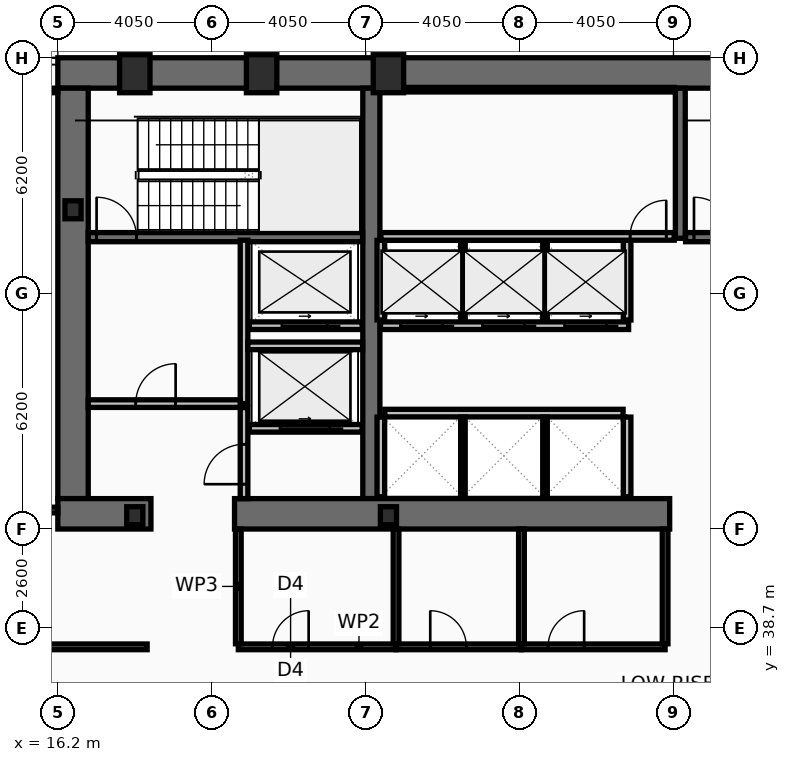
"""IFC4 building model, lengths in metres.
Left out: names, types, materials, properties, quantities, classifications, styles, units other than length and angle.
Written with IfcOpenShell. Run it as: python <this file> out.ifc"""

import sys

from ifc_helpers import new_model, si_unit, direction, frame, frame_2d, origin, origin_2d, place, context, subcontext, project, spatial, rectangle, hollow_rectangle, i_section, extrude, element, fill, save


model = new_model("IFC4")
c1 = context("Model", 3, precision=1e-05, world=origin(), true_north=direction((0.0, 1.0)))
c2 = subcontext(c1, "Body", "Model", "MODEL_VIEW")
j1 = project(units=[si_unit("LENGTHUNIT", "METRE"), si_unit("PLANEANGLEUNIT", "RADIAN")], contexts=[c1])
p1 = place(None, origin())
s1 = spatial("IfcSite", under=j1, at=p1, CompositionType="ELEMENT")
p2 = place(p1, origin())
s2 = spatial("IfcBuilding", under=s1, at=p2, CompositionType="ELEMENT")
p3 = place(p2, frame((0.0, 0.0, 77.8)))
s3 = spatial("IfcBuildingStorey", under=s2, at=p3, CompositionType="ELEMENT", Elevation=77.8)
p4 = place(p3, frame((16.2, 53.3, 0.0), z_axis=(0.0, 0.0, 1.0), x_axis=(1.0, 0.0, 0.0)))
e1 = element("IfcWall", 1, at=p4, inside=s3, PredefinedType="SHEAR", context=c2, shape_type="SweptSolid", body=[
    extrude(rectangle(XDim=40.5, YDim=0.8, at=frame_2d((20.25, 0.0))), origin(), (0.0, 0.0, 1.0), 3.82),
])
p5 = place(p3, frame((16.6, 42.1, 0.0), z_axis=(0.0, 0.0, 1.0), x_axis=(0.0, 1.0, 0.0)))
e2 = element("IfcWall", 2, at=p5, inside=s3, PredefinedType="SHEAR", context=c2, shape_type="SweptSolid", body=[
    extrude(rectangle(XDim=10.8, YDim=0.8, at=frame_2d((5.4, 0.0))), origin(), (0.0, 0.0, 1.0), 3.82),
])
p6 = place(p3, frame((24.45, 42.1, 0.0), z_axis=(0.0, 0.0, 1.0), x_axis=(0.0, 1.0, 0.0)))
e3 = element("IfcWall", 3, at=p6, inside=s3, PredefinedType="SHEAR", context=c2, shape_type="SweptSolid", body=[
    extrude(rectangle(XDim=10.8, YDim=0.45, at=frame_2d((5.4, 0.0))), origin(), (0.0, 0.0, 1.0), 3.82),
])
p7 = place(p3, frame((18.65, 41.7, 0.0), z_axis=(0.0, 0.0, 1.0), x_axis=(-1.0, 0.0, 0.0)))
e4 = element("IfcWall", 4, at=p7, inside=s3, PredefinedType="SHEAR", context=c2, shape_type="SweptSolid", body=[
    extrude(rectangle(XDim=2.45, YDim=0.8, at=frame_2d((1.225, 0.0))), origin(), (0.0, 0.0, 1.0), 3.82),
])
p8 = place(p3, frame((32.3, 41.7, 0.0), z_axis=(0.0, 0.0, 1.0), x_axis=(-1.0, 0.0, 0.0)))
e5 = element("IfcWall", 5, at=p8, inside=s3, PredefinedType="SHEAR", context=c2, shape_type="SweptSolid", body=[
    extrude(rectangle(XDim=11.45, YDim=0.8, at=frame_2d((5.725, 0.0))), origin(), (0.0, 0.0, 1.0), 3.82),
])
p9 = place(p3, frame((32.58, 48.95, 0.0), z_axis=(0.0, 0.0, 1.0), x_axis=(0.0, 1.0, 0.0)))
e6 = element("IfcWall", 6, at=p9, inside=s3, PredefinedType="SHEAR", context=c2, shape_type="SweptSolid", body=[
    extrude(rectangle(XDim=3.95, YDim=0.26, at=frame_2d((1.975, 0.0))), origin(), (0.0, 0.0, 1.0), 3.82),
])
p10 = place(p3, frame((17.0, 48.98, 0.0), z_axis=(0.0, 0.0, 1.0), x_axis=(1.0, 0.0, 0.0)))
e7 = element("IfcWall", 7, at=p10, inside=s3, PredefinedType="SHEAR", context=c2, shape_type="SweptSolid", body=[
    extrude(rectangle(XDim=7.22, YDim=0.24, at=frame_2d((3.61, 0.0))), origin(), (0.0, 0.0, 1.0), 3.82),
])
p11 = place(p10, frame((0.22, 0.0, 0.0)))
e8 = element("IfcOpeningElement", 8, at=p11, cuts=e7, PredefinedType="OPENING", context=c2, shape_type="SweptSolid", body=[
    extrude(rectangle(XDim=1.05, YDim=2.15, at=frame_2d((0.525, 1.075))), frame((0.0, 0.13, 0.0), z_axis=(0.0, -1.0, 0.0), x_axis=(1.0, 0.0, 0.0)), (0.0, 0.0, 1.0), 0.26),
])
p12 = place(p3, frame((32.72, 48.98, 0.0), z_axis=(0.0, 0.0, 1.0), x_axis=(1.0, 0.0, 0.0)))
e9 = element("IfcWall", 9, at=p12, inside=s3, PredefinedType="SHEAR", context=c2, shape_type="SweptSolid", body=[
    extrude(rectangle(XDim=7.56, YDim=0.24, at=frame_2d((3.78, 0.0))), origin(), (0.0, 0.0, 1.0), 3.82),
])
p13 = place(p12, frame((0.22, 0.0, 0.0)))
e10 = element("IfcOpeningElement", 10, at=p13, cuts=e9, PredefinedType="OPENING", context=c2, shape_type="SweptSolid", body=[
    extrude(rectangle(XDim=1.05, YDim=2.15, at=frame_2d((0.525, 1.075))), frame((0.0, 0.13, 0.0), z_axis=(0.0, -1.0, 0.0), x_axis=(1.0, 0.0, 0.0)), (0.0, 0.0, 1.0), 0.26),
])
for number, where, z_axis, x_axis in (
    (11, (18.225, 53.28, 0.0), (0.0, 0.0, 1.0), (1.0, 0.0, 0.0)),
    (12, (21.562, 53.28, 0.0), (0.0, 0.0, 1.0), (1.0, 0.0, 0.0)),
    (13, (24.9, 53.28, 0.0), (0.0, 0.0, 1.0), (1.0, 0.0, 0.0)),
):
    element("IfcColumn", number, at=place(p3, frame(where, z_axis=z_axis, x_axis=x_axis)), inside=s3, PredefinedType="COLUMN", context=c2, shape_type="SweptSolid", body=[
        extrude(hollow_rectangle(XDim=0.8, YDim=1.0, WallThickness=0.055, at=origin_2d()), origin(), (0.0, 0.0, 1.0), 4.0),
    ])
for number, where, z_axis, x_axis in (
    (14, (16.6, 49.7, 0.0), (0.0, 0.0, 1.0), (1.0, 0.0, 0.0)),
    (15, (18.225, 41.65, 0.0), (0.0, 0.0, 1.0), (1.0, 0.0, 0.0)),
    (16, (24.9, 41.65, 0.0), (0.0, 0.0, 1.0), (1.0, 0.0, 0.0)),
):
    element("IfcColumn", number, at=place(p3, frame(where, z_axis=z_axis, x_axis=x_axis)), inside=s3, PredefinedType="COLUMN", context=c2, shape_type="SweptSolid", body=[
        extrude(i_section(OverallWidth=0.424, OverallDepth=0.474, WebThickness=0.048, FlangeThickness=0.077, at=origin_2d()), origin(), (0.0, 0.0, 1.0), 4.0),
    ])
p14 = place(p3, frame((24.21, 43.95, 0.0), z_axis=(0.0, 0.0, 1.0), x_axis=(-1.0, 0.0, 0.0)))
e17 = element("IfcWall", 17, at=p14, inside=s3, PredefinedType="PARTITIONING", context=c2, shape_type="SweptSolid", body=[
    extrude(rectangle(XDim=2.97, YDim=0.2, at=frame_2d((1.485, 0.0))), origin(), (0.0, 0.0, 1.0), 3.82),
])
p15 = place(p14, frame((0.86, 0.0, 0.0)))
e18 = element("IfcOpeningElement", 18, at=p15, cuts=e17, PredefinedType="OPENING", context=c2, shape_type="SweptSolid", body=[
    extrude(rectangle(XDim=1.3, YDim=2.18, at=frame_2d((0.65, 1.09))), frame((0.0, 0.11, 0.0), z_axis=(0.0, -1.0, 0.0), x_axis=(1.0, 0.0, 0.0)), (0.0, 0.0, 1.0), 0.22),
])
p16 = place(p3, frame((24.21, 46.65, 0.0), z_axis=(0.0, 0.0, 1.0), x_axis=(-1.0, 0.0, 0.0)))
e19 = element("IfcWall", 19, at=p16, inside=s3, PredefinedType="PARTITIONING", context=c2, shape_type="SweptSolid", body=[
    extrude(rectangle(XDim=2.97, YDim=0.2, at=frame_2d((1.485, 0.0))), origin(), (0.0, 0.0, 1.0), 3.82),
])
p17 = place(p16, frame((0.91, 0.0, 0.0)))
e20 = element("IfcOpeningElement", 20, at=p17, cuts=e19, PredefinedType="OPENING", context=c2, shape_type="SweptSolid", body=[
    extrude(rectangle(XDim=1.2, YDim=2.18, at=frame_2d((0.6, 1.09))), frame((0.0, 0.11, 0.0), z_axis=(0.0, -1.0, 0.0), x_axis=(1.0, 0.0, 0.0)), (0.0, 0.0, 1.0), 0.22),
])
p18 = place(p3, frame((31.22, 46.65, 0.0), z_axis=(0.0, 0.0, 1.0), x_axis=(-1.0, 0.0, 0.0)))
e21 = element("IfcWall", 21, at=p18, inside=s3, PredefinedType="PARTITIONING", context=c2, shape_type="SweptSolid", body=[
    extrude(rectangle(XDim=6.53, YDim=0.2, at=frame_2d((3.265, 0.0))), origin(), (0.0, 0.0, 1.0), 3.82),
])
p19 = place(p18, frame((4.9, 0.0, 0.0)))
e22 = element("IfcOpeningElement", 22, at=p19, cuts=e21, PredefinedType="OPENING", context=c2, shape_type="SweptSolid", body=[
    extrude(rectangle(XDim=1.1, YDim=2.18, at=frame_2d((0.55, 1.09))), frame((0.0, 0.11, 0.0), z_axis=(0.0, -1.0, 0.0), x_axis=(1.0, 0.0, 0.0)), (0.0, 0.0, 1.0), 0.22),
])
p20 = place(p18, frame((2.74, 0.0, 0.0)))
e23 = element("IfcOpeningElement", 23, at=p20, cuts=e21, PredefinedType="OPENING", context=c2, shape_type="SweptSolid", body=[
    extrude(rectangle(XDim=1.1, YDim=2.18, at=frame_2d((0.55, 1.09))), frame((0.0, 0.11, 0.0), z_axis=(0.0, -1.0, 0.0), x_axis=(1.0, 0.0, 0.0)), (0.0, 0.0, 1.0), 0.22),
])
p21 = place(p18, frame((0.58, 0.0, 0.0)))
e24 = element("IfcOpeningElement", 24, at=p21, cuts=e21, PredefinedType="OPENING", context=c2, shape_type="SweptSolid", body=[
    extrude(rectangle(XDim=1.1, YDim=2.18, at=frame_2d((0.55, 1.09))), frame((0.0, 0.11, 0.0), z_axis=(0.0, -1.0, 0.0), x_axis=(1.0, 0.0, 0.0)), (0.0, 0.0, 1.0), 0.22),
])
p22 = place(p3, frame((21.1, 44.6, 0.0), z_axis=(0.0, 0.0, 1.0), x_axis=(0.0, 1.0, 0.0)))
e25 = element("IfcWall", 25, at=p22, inside=s3, PredefinedType="PARTITIONING", context=c2, shape_type="SweptSolid", body=[
    extrude(rectangle(XDim=4.3, YDim=0.2, at=frame_2d((2.15, 0.0))), origin(), (0.0, 0.0, 1.0), 3.82),
])
p23 = place(p3, frame((17.0, 44.6, 0.0), z_axis=(0.0, 0.0, 1.0), x_axis=(1.0, 0.0, 0.0)))
e26 = element("IfcWall", 26, at=p23, inside=s3, PredefinedType="PARTITIONING", context=c2, shape_type="SweptSolid", body=[
    extrude(rectangle(XDim=4.0, YDim=0.2, at=frame_2d((2.0, 0.0))), origin(), (0.0, 0.0, 1.0), 3.82),
])
p24 = place(p23, frame((1.25, 0.0, 0.0)))
e27 = element("IfcOpeningElement", 27, at=p24, cuts=e26, PredefinedType="OPENING", context=c2, shape_type="SweptSolid", body=[
    extrude(rectangle(XDim=1.05, YDim=2.15, at=frame_2d((0.525, 1.075))), frame((0.0, 0.11, 0.0), z_axis=(0.0, -1.0, 0.0), x_axis=(1.0, 0.0, 0.0)), (0.0, 0.0, 1.0), 0.22),
])
p25 = place(p3, frame((21.2, 46.12, 0.0), z_axis=(0.0, 0.0, 1.0), x_axis=(1.0, 0.0, 0.0)))
e28 = element("IfcWall", 28, at=p25, inside=s3, PredefinedType="PARTITIONING", context=c2, shape_type="SweptSolid", body=[
    extrude(rectangle(XDim=3.02, YDim=0.2, at=frame_2d((1.51, 0.0))), origin(), (0.0, 0.0, 1.0), 3.82),
])
p26 = place(p3, frame((21.1, 42.1, 0.0), z_axis=(0.0, 0.0, 1.0), x_axis=(0.0, 1.0, 0.0)))
e29 = element("IfcWall", 29, at=p26, inside=s3, PredefinedType="PARTITIONING", context=c2, shape_type="SweptSolid", body=[
    extrude(rectangle(XDim=2.395, YDim=0.2, at=frame_2d((1.198, 0.0))), origin(), (0.0, 0.0, 1.0), 3.82),
])
p27 = place(p26, frame((0.38, 0.0, 0.0)))
e30 = element("IfcOpeningElement", 30, at=p27, cuts=e29, PredefinedType="OPENING", context=c2, shape_type="SweptSolid", body=[
    extrude(rectangle(XDim=1.05, YDim=2.15, at=frame_2d((0.525, 1.075))), frame((0.0, 0.11, 0.0), z_axis=(0.0, -1.0, 0.0), x_axis=(1.0, 0.0, 0.0)), (0.0, 0.0, 1.0), 0.22),
])
for number, where, z_axis, x_axis in (
    (31, (24.7, 46.8, 0.0), (0.0, 0.0, 1.0), (0.0, 1.0, 0.0)),
    (32, (31.18, 46.8, 0.0), (0.0, 0.0, 1.0), (0.0, 1.0, 0.0)),
):
    element("IfcWall", number, at=place(p3, frame(where, z_axis=z_axis, x_axis=x_axis)), inside=s3, PredefinedType="PARTITIONING", context=c2, shape_type="SweptSolid", body=[
        extrude(rectangle(XDim=2.095, YDim=0.2, at=frame_2d((1.047, 0.0))), origin(), (0.0, 0.0, 1.0), 3.82),
    ])
for number, where, z_axis, x_axis in (
    (33, (26.86, 46.8, 0.0), (0.0, 0.0, 1.0), (0.0, 1.0, 0.0)),
    (34, (29.02, 46.8, 0.0), (0.0, 0.0, 1.0), (0.0, 1.0, 0.0)),
):
    element("IfcWall", number, at=place(p3, frame(where, z_axis=z_axis, x_axis=x_axis)), inside=s3, PredefinedType="PARTITIONING", context=c2, shape_type="SweptSolid", body=[
        extrude(rectangle(XDim=2.095, YDim=0.12, at=frame_2d((1.047, 0.0))), origin(), (0.0, 0.0, 1.0), 3.82),
    ])
p28 = place(p3, frame((24.805, 44.35, 0.0), z_axis=(0.0, 0.0, 1.0), x_axis=(1.0, 0.0, 0.0)))
e35 = element("IfcWall", 35, at=p28, inside=s3, PredefinedType="PARTITIONING", context=c2, shape_type="SweptSolid", body=[
    extrude(rectangle(XDim=6.27, YDim=0.2, at=frame_2d((3.135, 0.0))), origin(), (0.0, 0.0, 1.0), 3.82),
])
for number, where, z_axis, x_axis in (
    (36, (24.7, 42.15, 0.0), (0.0, 0.0, 1.0), (0.0, 1.0, 0.0)),
    (37, (31.18, 42.15, 0.0), (0.0, 0.0, 1.0), (0.0, 1.0, 0.0)),
):
    element("IfcWall", number, at=place(p3, frame(where, z_axis=z_axis, x_axis=x_axis)), inside=s3, PredefinedType="PARTITIONING", context=c2, shape_type="SweptSolid", body=[
        extrude(rectangle(XDim=2.095, YDim=0.2, at=frame_2d((1.048, 0.0))), origin(), (0.0, 0.0, 1.0), 3.82),
    ])
for number, where, z_axis, x_axis in (
    (38, (26.86, 42.15, 0.0), (0.0, 0.0, 1.0), (0.0, 1.0, 0.0)),
    (39, (29.02, 42.15, 0.0), (0.0, 0.0, 1.0), (0.0, 1.0, 0.0)),
):
    element("IfcWall", number, at=place(p3, frame(where, z_axis=z_axis, x_axis=x_axis)), inside=s3, PredefinedType="PARTITIONING", context=c2, shape_type="SweptSolid", body=[
        extrude(rectangle(XDim=2.095, YDim=0.12, at=frame_2d((1.048, 0.0))), origin(), (0.0, 0.0, 1.0), 3.82),
    ])
p29 = place(p3, frame((24.7, 52.86, 0.0), z_axis=(0.0, 0.0, 1.0), x_axis=(1.0, 0.0, 0.0)))
e40 = element("IfcWall", 40, at=p29, inside=s3, PredefinedType="PARTITIONING", context=c2, shape_type="SweptSolid", body=[
    extrude(rectangle(XDim=7.72, YDim=0.12, at=frame_2d((3.86, 0.0))), origin(), (0.0, 0.0, 1.0), 3.82),
])
p30 = place(p3, frame((24.7, 49.0, 0.0), z_axis=(0.0, 0.0, 1.0), x_axis=(1.0, 0.0, 0.0)))
e41 = element("IfcWall", 41, at=p30, inside=s3, PredefinedType="PARTITIONING", context=c2, shape_type="SweptSolid", body=[
    extrude(rectangle(XDim=7.72, YDim=0.2, at=frame_2d((3.86, 0.0))), origin(), (0.0, 0.0, 1.0), 3.82),
])
p31 = place(p30, frame((6.56, 0.0, 0.0)))
e42 = element("IfcOpeningElement", 42, at=p31, cuts=e41, PredefinedType="OPENING", context=c2, shape_type="SweptSolid", body=[
    extrude(rectangle(XDim=0.95, YDim=2.1, at=frame_2d((0.475, 1.05))), frame((0.0, 0.11, 0.0), z_axis=(0.0, -1.0, 0.0), x_axis=(1.0, 0.0, 0.0)), (0.0, 0.0, 1.0), 0.22),
])
p32 = place(p3, frame((20.95, 38.2, 0.0), z_axis=(0.0, 0.0, 1.0), x_axis=(1.0, 0.0, 0.0)))
e43 = element("IfcWall", 43, at=p32, inside=s3, PredefinedType="PARTITIONING", context=c2, shape_type="SweptSolid", body=[
    extrude(rectangle(XDim=4.15, YDim=0.15, at=frame_2d((2.075, 0.0))), origin(), (0.0, 0.0, 1.0), 3.01),
])
p33 = place(p32, frame((0.9, 0.0, 0.0)))
e44 = element("IfcOpeningElement", 44, at=p33, cuts=e43, PredefinedType="OPENING", context=c2, shape_type="SweptSolid", body=[
    extrude(rectangle(XDim=0.95, YDim=2.05, at=frame_2d((0.475, 1.025))), frame((0.0, 0.085, 0.0), z_axis=(0.0, -1.0, 0.0), x_axis=(1.0, 0.0, 0.0)), (0.0, 0.0, 1.0), 0.17),
])
p34 = place(p3, frame((25.1, 38.2, 0.0), z_axis=(0.0, 0.0, 1.0), x_axis=(1.0, 0.0, 0.0)))
e45 = element("IfcWall", 45, at=p34, inside=s3, PredefinedType="PARTITIONING", context=c2, shape_type="SweptSolid", body=[
    extrude(rectangle(XDim=3.3, YDim=0.15, at=frame_2d((1.65, 0.0))), origin(), (0.0, 0.0, 1.0), 3.01),
])
p35 = place(p34, frame((0.9, 0.0, 0.0)))
e46 = element("IfcOpeningElement", 46, at=p35, cuts=e45, PredefinedType="OPENING", context=c2, shape_type="SweptSolid", body=[
    extrude(rectangle(XDim=0.95, YDim=2.05, at=frame_2d((0.475, 1.025))), frame((0.0, 0.085, 0.0), z_axis=(0.0, -1.0, 0.0), x_axis=(1.0, 0.0, 0.0)), (0.0, 0.0, 1.0), 0.17),
])
p36 = place(p3, frame((28.4, 38.2, 0.0), z_axis=(0.0, 0.0, 1.0), x_axis=(1.0, 0.0, 0.0)))
e47 = element("IfcWall", 47, at=p36, inside=s3, PredefinedType="PARTITIONING", context=c2, shape_type="SweptSolid", body=[
    extrude(rectangle(XDim=3.78, YDim=0.15, at=frame_2d((1.89, 0.0))), origin(), (0.0, 0.0, 1.0), 3.01),
])
p37 = place(p36, frame((0.7, 0.0, 0.0)))
e48 = element("IfcOpeningElement", 48, at=p37, cuts=e47, PredefinedType="OPENING", context=c2, shape_type="SweptSolid", body=[
    extrude(rectangle(XDim=0.95, YDim=2.05, at=frame_2d((0.475, 1.025))), frame((0.0, 0.085, 0.0), z_axis=(0.0, -1.0, 0.0), x_axis=(1.0, 0.0, 0.0)), (0.0, 0.0, 1.0), 0.17),
])
p38 = place(p3, frame((20.95, 38.28, 0.0), z_axis=(0.0, 0.0, 1.0), x_axis=(0.0, 1.0, 0.0)))
e49 = element("IfcWall", 49, at=p38, inside=s3, PredefinedType="PARTITIONING", context=c2, shape_type="SweptSolid", body=[
    extrude(rectangle(XDim=3.02, YDim=0.15, at=frame_2d((1.51, 0.0))), origin(), (0.0, 0.0, 1.0), 3.82),
])
p39 = place(p3, frame((25.1, 38.28, 0.0), z_axis=(0.0, 0.0, 1.0), x_axis=(0.0, 1.0, 0.0)))
e50 = element("IfcWall", 50, at=p39, inside=s3, PredefinedType="PARTITIONING", context=c2, shape_type="SweptSolid", body=[
    extrude(rectangle(XDim=3.02, YDim=0.15, at=frame_2d((1.51, 0.0))), origin(), (0.0, 0.0, 1.0), 3.01),
])
for number, where, z_axis, x_axis in (
    (51, (28.4, 38.28, 0.0), (0.0, 0.0, 1.0), (0.0, 1.0, 0.0)),
    (52, (32.18, 38.28, 0.0), (0.0, 0.0, 1.0), (0.0, 1.0, 0.0)),
):
    element("IfcWall", number, at=place(p3, frame(where, z_axis=z_axis, x_axis=x_axis)), inside=s3, PredefinedType="PARTITIONING", context=c2, shape_type="SweptSolid", body=[
        extrude(rectangle(XDim=3.02, YDim=0.15, at=frame_2d((1.51, 0.0))), origin(), (0.0, 0.0, 1.0), 3.82),
    ])
p40 = place(p3, frame((2.03, 38.2, 0.0), z_axis=(0.0, 0.0, 1.0), x_axis=(1.0, 0.0, 0.0)))
e53 = element("IfcWall", 53, at=p40, inside=s3, PredefinedType="PARTITIONING", context=c2, shape_type="SweptSolid", body=[
    extrude(rectangle(XDim=16.52, YDim=0.15, at=frame_2d((8.26, 0.0))), origin(), (0.0, 0.0, 1.0), 3.01),
])
p41 = place(p40, frame((12.32, 0.0, 0.0)))
e54 = element("IfcOpeningElement", 54, at=p41, cuts=e53, PredefinedType="OPENING", context=c2, shape_type="SweptSolid", body=[
    extrude(rectangle(XDim=0.95, YDim=2.05, at=frame_2d((0.475, 1.025))), frame((0.0, 0.085, 0.0), z_axis=(0.0, -1.0, 0.0), x_axis=(1.0, 0.0, 0.0)), (0.0, 0.0, 1.0), 0.17),
])
p42 = place(p3, frame((2.095, 41.8, 0.0), z_axis=(0.0, 0.0, 1.0), x_axis=(1.0, 0.0, 0.0)))
e55 = element("IfcWall", 55, at=p42, inside=s3, PredefinedType="PARTITIONING", context=c2, shape_type="SweptSolid", body=[
    extrude(rectangle(XDim=14.105, YDim=0.15, at=frame_2d((7.052, 0.0))), origin(), (0.0, 0.0, 1.0), 3.16),
])
p43 = place(p42, frame((12.32, 0.0, 0.0)))
e56 = element("IfcOpeningElement", 56, at=p43, cuts=e55, PredefinedType="OPENING", context=c2, shape_type="SweptSolid", body=[
    extrude(rectangle(XDim=0.9, YDim=2.05, at=frame_2d((0.45, 1.025))), frame((0.0, 0.085, 0.0), z_axis=(0.0, -1.0, 0.0), x_axis=(1.0, 0.0, 0.0)), (0.0, 0.0, 1.0), 0.17),
])
p44 = place(p3, frame((2.095, 52.84, 0.0), z_axis=(0.0, 0.0, 1.0), x_axis=(1.0, 0.0, 0.0)))
e57 = element("IfcWall", 57, at=p44, inside=s3, PredefinedType="PARTITIONING", context=c2, shape_type="SweptSolid", body=[
    extrude(rectangle(XDim=14.105, YDim=0.12, at=frame_2d((7.052, 0.0))), origin(), (0.0, 0.0, 1.0), 3.82),
])
p45 = place(p11, origin())
e58 = element("IfcDoor", 58, at=p45, inside=s3, OperationType="SINGLE_SWING_LEFT", PredefinedType="DOOR", context=c2, shape_type="SweptSolid", body=[
    extrude(rectangle(XDim=1.05, YDim=2.15, at=frame_2d((0.525, 1.075))), frame((0.0, 0.025, 0.0), z_axis=(0.0, -1.0, 0.0), x_axis=(1.0, 0.0, 0.0)), (0.0, 0.0, 1.0), 0.05),
])
fill(e8, e58)
p46 = place(p13, origin())
e59 = element("IfcDoor", 59, at=p46, inside=s3, OperationType="SINGLE_SWING_LEFT", PredefinedType="DOOR", context=c2, shape_type="SweptSolid", body=[
    extrude(rectangle(XDim=1.05, YDim=2.15, at=frame_2d((0.525, 1.075))), frame((0.0, 0.025, 0.0), z_axis=(0.0, -1.0, 0.0), x_axis=(1.0, 0.0, 0.0)), (0.0, 0.0, 1.0), 0.05),
])
fill(e10, e59)
p47 = place(p15, origin())
e60 = element("IfcDoor", 60, at=p47, inside=s3, OperationType="SLIDING_TO_LEFT", PredefinedType="DOOR", context=c2, shape_type="SweptSolid", body=[
    extrude(rectangle(XDim=1.3, YDim=2.18, at=frame_2d((0.65, 1.09))), frame((0.0, 0.025, 0.0), z_axis=(0.0, -1.0, 0.0), x_axis=(1.0, 0.0, 0.0)), (0.0, 0.0, 1.0), 0.05),
])
fill(e18, e60)
p48 = place(p17, origin())
e61 = element("IfcDoor", 61, at=p48, inside=s3, OperationType="SLIDING_TO_LEFT", PredefinedType="DOOR", context=c2, shape_type="SweptSolid", body=[
    extrude(rectangle(XDim=1.2, YDim=2.18, at=frame_2d((0.6, 1.09))), frame((0.0, 0.025, 0.0), z_axis=(0.0, -1.0, 0.0), x_axis=(1.0, 0.0, 0.0)), (0.0, 0.0, 1.0), 0.05),
])
fill(e20, e61)
p49 = place(p19, origin())
e62 = element("IfcDoor", 62, at=p49, inside=s3, OperationType="SLIDING_TO_LEFT", PredefinedType="DOOR", context=c2, shape_type="SweptSolid", body=[
    extrude(rectangle(XDim=1.1, YDim=2.18, at=frame_2d((0.55, 1.09))), frame((0.0, 0.025, 0.0), z_axis=(0.0, -1.0, 0.0), x_axis=(1.0, 0.0, 0.0)), (0.0, 0.0, 1.0), 0.05),
])
fill(e22, e62)
p50 = place(p20, origin())
e63 = element("IfcDoor", 63, at=p50, inside=s3, OperationType="SLIDING_TO_LEFT", PredefinedType="DOOR", context=c2, shape_type="SweptSolid", body=[
    extrude(rectangle(XDim=1.1, YDim=2.18, at=frame_2d((0.55, 1.09))), frame((0.0, 0.025, 0.0), z_axis=(0.0, -1.0, 0.0), x_axis=(1.0, 0.0, 0.0)), (0.0, 0.0, 1.0), 0.05),
])
fill(e23, e63)
p51 = place(p21, origin())
e64 = element("IfcDoor", 64, at=p51, inside=s3, OperationType="SLIDING_TO_LEFT", PredefinedType="DOOR", context=c2, shape_type="SweptSolid", body=[
    extrude(rectangle(XDim=1.1, YDim=2.18, at=frame_2d((0.55, 1.09))), frame((0.0, 0.025, 0.0), z_axis=(0.0, -1.0, 0.0), x_axis=(1.0, 0.0, 0.0)), (0.0, 0.0, 1.0), 0.05),
])
fill(e24, e64)
p52 = place(p24, origin())
e65 = element("IfcDoor", 65, at=p52, inside=s3, OperationType="SINGLE_SWING_RIGHT", PredefinedType="DOOR", context=c2, shape_type="SweptSolid", body=[
    extrude(rectangle(XDim=1.05, YDim=2.15, at=frame_2d((0.525, 1.075))), frame((0.0, 0.025, 0.0), z_axis=(0.0, -1.0, 0.0), x_axis=(1.0, 0.0, 0.0)), (0.0, 0.0, 1.0), 0.05),
])
fill(e27, e65)
p53 = place(p27, origin())
e66 = element("IfcDoor", 66, at=p53, inside=s3, OperationType="SINGLE_SWING_LEFT", PredefinedType="DOOR", context=c2, shape_type="SweptSolid", body=[
    extrude(rectangle(XDim=1.05, YDim=2.15, at=frame_2d((0.525, 1.075))), frame((0.0, 0.025, 0.0), z_axis=(0.0, -1.0, 0.0), x_axis=(1.0, 0.0, 0.0)), (0.0, 0.0, 1.0), 0.05),
])
fill(e30, e66)
p54 = place(p31, origin())
e67 = element("IfcDoor", 67, at=p54, inside=s3, OperationType="SINGLE_SWING_RIGHT", PredefinedType="DOOR", context=c2, shape_type="SweptSolid", body=[
    extrude(rectangle(XDim=0.95, YDim=2.1, at=frame_2d((0.475, 1.05))), frame((0.0, 0.025, 0.0), z_axis=(0.0, -1.0, 0.0), x_axis=(1.0, 0.0, 0.0)), (0.0, 0.0, 1.0), 0.05),
])
fill(e42, e67)
p55 = place(p33, origin())
e68 = element("IfcDoor", 68, at=p55, inside=s3, OperationType="SINGLE_SWING_RIGHT", PredefinedType="DOOR", context=c2, shape_type="SweptSolid", body=[
    extrude(rectangle(XDim=0.95, YDim=2.05, at=frame_2d((0.475, 1.025))), frame((0.0, 0.025, 0.0), z_axis=(0.0, -1.0, 0.0), x_axis=(1.0, 0.0, 0.0)), (0.0, 0.0, 1.0), 0.05),
])
fill(e44, e68)
p56 = place(p35, origin())
e69 = element("IfcDoor", 69, at=p56, inside=s3, OperationType="SINGLE_SWING_LEFT", PredefinedType="DOOR", context=c2, shape_type="SweptSolid", body=[
    extrude(rectangle(XDim=0.95, YDim=2.05, at=frame_2d((0.475, 1.025))), frame((0.0, 0.025, 0.0), z_axis=(0.0, -1.0, 0.0), x_axis=(1.0, 0.0, 0.0)), (0.0, 0.0, 1.0), 0.05),
])
fill(e46, e69)
p57 = place(p37, origin())
e70 = element("IfcDoor", 70, at=p57, inside=s3, OperationType="SINGLE_SWING_RIGHT", PredefinedType="DOOR", context=c2, shape_type="SweptSolid", body=[
    extrude(rectangle(XDim=0.95, YDim=2.05, at=frame_2d((0.475, 1.025))), frame((0.0, 0.025, 0.0), z_axis=(0.0, -1.0, 0.0), x_axis=(1.0, 0.0, 0.0)), (0.0, 0.0, 1.0), 0.05),
])
fill(e48, e70)
save(model, sys.argv[1])
